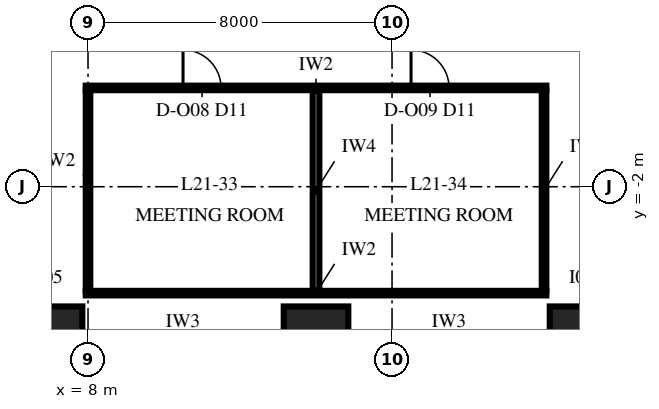
"""IFC4 building model, lengths in metres.
Left out: names, types, materials, properties, quantities, classifications, styles, units other than length and angle.
Written with IfcOpenShell. Run it as: python <this file> out.ifc"""

import sys

from ifc_helpers import new_model, si_unit, direction, frame, frame_2d, origin, origin_2d, place, context, subcontext, project, spatial, rectangle, extrude, element, fill, save


model = new_model("IFC4")
c1 = context("Model", 3, precision=1e-05, world=origin(), true_north=direction((0.0, 1.0)))
c2 = subcontext(c1, "Body", "Model", "MODEL_VIEW")
j1 = project(units=[si_unit("LENGTHUNIT", "METRE"), si_unit("PLANEANGLEUNIT", "RADIAN")], contexts=[c1])
p1 = place(None, origin())
s1 = spatial("IfcSite", under=j1, at=p1, CompositionType="ELEMENT")
p2 = place(p1, origin())
s2 = spatial("IfcBuilding", under=s1, at=p2, CompositionType="ELEMENT")
p3 = place(p2, frame((0.0, 0.0, 98.0)))
s3 = spatial("IfcBuildingStorey", under=s2, at=p3, CompositionType="ELEMENT", Elevation=98.0)
for number, where, z_axis, x_axis in (
    (1, (7.0, -6.0, 0.0), (0.0, 0.0, 1.0), (1.0, 0.0, 0.0)),
    (2, (14.0, -6.0, 0.0), (0.0, 0.0, 1.0), (1.0, 0.0, 0.0)),
    (3, (21.0, -6.0, 0.0), (0.0, 0.0, 1.0), (1.0, 0.0, 0.0)),
):
    element("IfcColumn", number, at=place(p3, frame(where, z_axis=z_axis, x_axis=x_axis)), inside=s3, PredefinedType="COLUMN", context=c2, shape_type="SweptSolid", body=[
        extrude(rectangle(XDim=1.7, YDim=1.7, at=origin_2d()), origin(), (0.0, 0.0, 1.0), 5.0),
    ])
p4 = place(p3, frame((7.94, -4.8, 0.0), z_axis=(0.0, 0.0, 1.0), x_axis=(1.0, 0.0, 0.0)))
e4 = element("IfcWall", 4, at=p4, inside=s3, PredefinedType="PARTITIONING", context=c2, shape_type="SweptSolid", body=[
    extrude(rectangle(XDim=12.12, YDim=0.12, at=frame_2d((6.06, 0.0))), origin(), (0.0, 0.0, 1.0), 4.25),
])
p5 = place(p3, frame((7.94, 0.6, 0.0), z_axis=(0.0, 0.0, 1.0), x_axis=(1.0, 0.0, 0.0)))
e5 = element("IfcWall", 5, at=p5, inside=s3, PredefinedType="PARTITIONING", context=c2, shape_type="SweptSolid", body=[
    extrude(rectangle(XDim=12.12, YDim=0.12, at=frame_2d((6.06, 0.0))), origin(), (0.0, 0.0, 1.0), 4.25),
])
p6 = place(p5, frame((2.56, 0.0, 0.0)))
e6 = element("IfcOpeningElement", 6, at=p6, cuts=e5, PredefinedType="OPENING", context=c2, shape_type="SweptSolid", body=[
    extrude(rectangle(XDim=1.0, YDim=2.4, at=frame_2d((0.5, 1.2))), frame((0.0, 0.075, 0.0), z_axis=(0.0, -1.0, 0.0), x_axis=(1.0, 0.0, 0.0)), (0.0, 0.0, 1.0), 0.15),
])
p7 = place(p5, frame((8.56, 0.0, 0.0)))
e7 = element("IfcOpeningElement", 7, at=p7, cuts=e5, PredefinedType="OPENING", context=c2, shape_type="SweptSolid", body=[
    extrude(rectangle(XDim=1.0, YDim=2.4, at=frame_2d((0.5, 1.2))), frame((0.0, 0.075, 0.0), z_axis=(0.0, -1.0, 0.0), x_axis=(1.0, 0.0, 0.0)), (0.0, 0.0, 1.0), 0.15),
])
p8 = place(p3, frame((8.0, -4.74, 0.0), z_axis=(0.0, 0.0, 1.0), x_axis=(0.0, 1.0, 0.0)))
e8 = element("IfcWall", 8, at=p8, inside=s3, PredefinedType="PARTITIONING", context=c2, shape_type="SweptSolid", body=[
    extrude(rectangle(XDim=5.28, YDim=0.12, at=frame_2d((2.64, 0.0))), origin(), (0.0, 0.0, 1.0), 4.85),
])
p9 = place(p3, frame((14.0, -4.74, 0.0), z_axis=(0.0, 0.0, 1.0), x_axis=(0.0, 1.0, 0.0)))
e9 = element("IfcWall", 9, at=p9, inside=s3, PredefinedType="PARTITIONING", context=c2, shape_type="SweptSolid", body=[
    extrude(rectangle(XDim=5.28, YDim=0.175, at=frame_2d((2.64, 0.0))), origin(), (0.0, 0.0, 1.0), 4.25),
])
p10 = place(p3, frame((20.0, -4.74, 0.0), z_axis=(0.0, 0.0, 1.0), x_axis=(0.0, 1.0, 0.0)))
e10 = element("IfcWall", 10, at=p10, inside=s3, PredefinedType="PARTITIONING", context=c2, shape_type="SweptSolid", body=[
    extrude(rectangle(XDim=5.28, YDim=0.12, at=frame_2d((2.64, 0.0))), origin(), (0.0, 0.0, 1.0), 4.85),
])
p11 = place(p6, origin())
e11 = element("IfcDoor", 11, at=p11, inside=s3, OperationType="SINGLE_SWING_RIGHT", PredefinedType="DOOR", context=c2, shape_type="SweptSolid", body=[
    extrude(rectangle(XDim=1.0, YDim=2.4, at=frame_2d((0.5, 1.2))), frame((0.0, 0.06, 0.0), z_axis=(0.0, -1.0, 0.0), x_axis=(1.0, 0.0, 0.0)), (0.0, 0.0, 1.0), 0.12),
])
fill(e6, e11)
p12 = place(p7, origin())
e12 = element("IfcDoor", 12, at=p12, inside=s3, OperationType="SINGLE_SWING_RIGHT", PredefinedType="DOOR", context=c2, shape_type="SweptSolid", body=[
    extrude(rectangle(XDim=1.0, YDim=2.4, at=frame_2d((0.5, 1.2))), frame((0.0, 0.06, 0.0), z_axis=(0.0, -1.0, 0.0), x_axis=(1.0, 0.0, 0.0)), (0.0, 0.0, 1.0), 0.12),
])
fill(e7, e12)
save(model, sys.argv[1])
